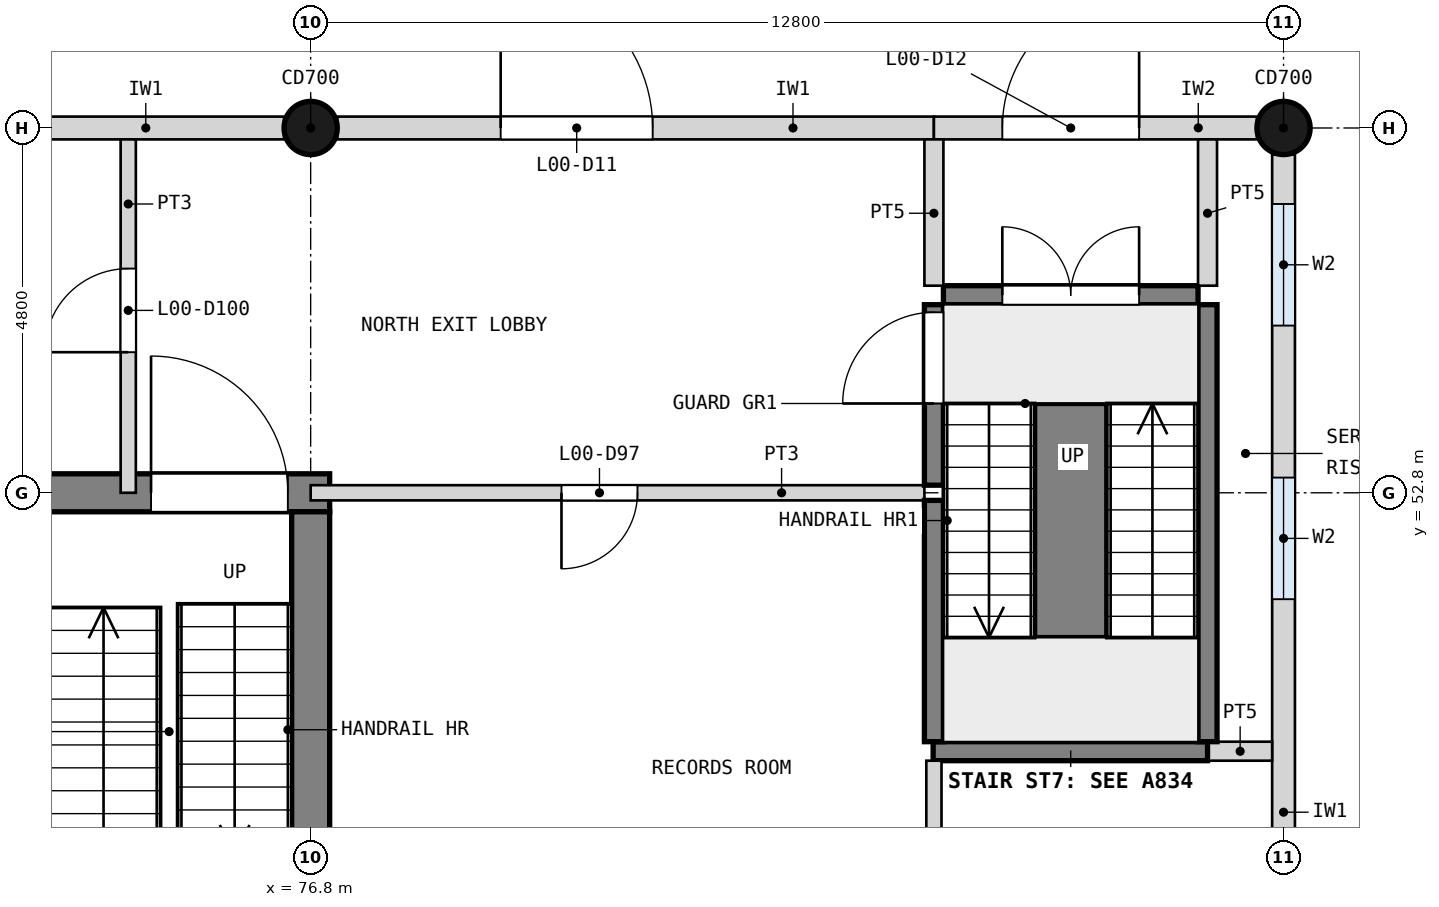
"""IFC4 building model, lengths in metres.
Left out: names, types, materials, properties, quantities, classifications, styles, units other than length and angle.
Written with IfcOpenShell. Run it as: python <this file> out.ifc"""

import sys

from ifc_helpers import new_model, si_unit, direction, frame, frame_2d, origin, origin_2d, place, context, subcontext, project, spatial, rectangle, circle, extrude, element, fill, save


model = new_model("IFC4")
c1 = context("Model", 3, precision=1e-05, world=origin(), true_north=direction((0.0, 1.0)))
c2 = subcontext(c1, "Body", "Model", "MODEL_VIEW")
j1 = project(units=[si_unit("LENGTHUNIT", "METRE"), si_unit("PLANEANGLEUNIT", "RADIAN")], contexts=[c1])
p1 = place(None, origin())
s1 = spatial("IfcSite", under=j1, at=p1, CompositionType="ELEMENT")
p2 = place(p1, origin())
s2 = spatial("IfcBuilding", under=s1, at=p2, CompositionType="ELEMENT")
p3 = place(p2, origin())
s3 = spatial("IfcBuildingStorey", under=s2, at=p3, CompositionType="ELEMENT", Elevation=0.0)
p4 = place(p3, frame((63.75, 52.8, 0.0), z_axis=(0.0, 0.0, 1.0), x_axis=(1.0, 0.0, 0.0)))
e1 = element("IfcWall", 1, at=p4, inside=s3, PredefinedType="SHEAR", context=c2, shape_type="SweptSolid", body=[
    extrude(rectangle(XDim=13.3, YDim=0.5, at=frame_2d((6.65, 0.0))), origin(), (0.0, 0.0, 1.0), 4.2),
])
p5 = place(p4, frame((10.95, 0.0, 0.0)))
e2 = element("IfcOpeningElement", 2, at=p5, cuts=e1, PredefinedType="OPENING", context=c2, shape_type="SweptSolid", body=[
    extrude(rectangle(XDim=1.8, YDim=2.1, at=frame_2d((0.9, 1.05))), frame((0.0, 0.26, 0.0), z_axis=(0.0, -1.0, 0.0), x_axis=(1.0, 0.0, 0.0)), (0.0, 0.0, 1.0), 0.52),
])
p6 = place(p3, frame((76.8, 33.85, 0.0), z_axis=(0.0, 0.0, 1.0), x_axis=(0.0, 1.0, 0.0)))
e3 = element("IfcWall", 3, at=p6, inside=s3, PredefinedType="SHEAR", context=c2, shape_type="SweptSolid", body=[
    extrude(rectangle(XDim=18.7, YDim=0.5, at=frame_2d((9.35, 0.0))), origin(), (0.0, 0.0, 1.0), 4.2),
])
for number, where, z_axis, x_axis in (
    (4, (89.6, 57.6, 0.0), (0.0, 0.0, 1.0), (1.0, 0.0, 0.0)),
    (5, (76.8, 57.6, 0.0), (0.0, 0.0, 1.0), (1.0, 0.0, 0.0)),
):
    element("IfcColumn", number, at=place(p3, frame(where, z_axis=z_axis, x_axis=x_axis)), inside=s3, PredefinedType="COLUMN", context=c2, shape_type="SweptSolid", body=[
        extrude(circle(Radius=0.35, at=origin_2d()), origin(), (0.0, 0.0, 1.0), 4.2),
    ])
p7 = place(p3, frame((64.0, 57.6, 0.0), z_axis=(0.0, 0.0, 1.0), x_axis=(1.0, 0.0, 0.0)))
e6 = element("IfcWall", 6, at=p7, inside=s3, PredefinedType="SOLIDWALL", context=c2, shape_type="SweptSolid", body=[
    extrude(rectangle(XDim=12.45, YDim=0.3, at=frame_2d((6.225, 0.0))), origin(), (0.0, 0.0, 1.0), 3.0),
])
p8 = place(p7, frame((0.8, 0.0, 0.3)))
e7 = element("IfcOpeningElement", 7, at=p8, cuts=e6, PredefinedType="OPENING", context=c2, shape_type="SweptSolid", body=[
    extrude(rectangle(XDim=1.6, YDim=2.4, at=frame_2d((0.8, 1.2))), frame((0.0, 0.16, 0.0), z_axis=(0.0, -1.0, 0.0), x_axis=(1.0, 0.0, 0.0)), (0.0, 0.0, 1.0), 0.32),
])
p9 = place(p7, frame((4.0, 0.0, 0.3)))
e8 = element("IfcOpeningElement", 8, at=p9, cuts=e6, PredefinedType="OPENING", context=c2, shape_type="SweptSolid", body=[
    extrude(rectangle(XDim=1.6, YDim=2.4, at=frame_2d((0.8, 1.2))), frame((0.0, 0.16, 0.0), z_axis=(0.0, -1.0, 0.0), x_axis=(1.0, 0.0, 0.0)), (0.0, 0.0, 1.0), 0.32),
])
p10 = place(p7, frame((7.2, 0.0, 0.3)))
e9 = element("IfcOpeningElement", 9, at=p10, cuts=e6, PredefinedType="OPENING", context=c2, shape_type="SweptSolid", body=[
    extrude(rectangle(XDim=1.6, YDim=2.4, at=frame_2d((0.8, 1.2))), frame((0.0, 0.16, 0.0), z_axis=(0.0, -1.0, 0.0), x_axis=(1.0, 0.0, 0.0)), (0.0, 0.0, 1.0), 0.32),
])
p11 = place(p3, frame((77.15, 57.6, 0.0), z_axis=(0.0, 0.0, 1.0), x_axis=(1.0, 0.0, 0.0)))
e10 = element("IfcWall", 10, at=p11, inside=s3, PredefinedType="SOLIDWALL", context=c2, shape_type="SweptSolid", body=[
    extrude(rectangle(XDim=7.85, YDim=0.3, at=frame_2d((3.925, 0.0))), origin(), (0.0, 0.0, 1.0), 3.0),
])
p12 = place(p11, frame((2.15, 0.0, 0.0)))
e11 = element("IfcOpeningElement", 11, at=p12, cuts=e10, PredefinedType="OPENING", context=c2, shape_type="SweptSolid", body=[
    extrude(rectangle(XDim=2.0, YDim=2.1, at=frame_2d((1.0, 1.05))), frame((0.0, 0.16, 0.0), z_axis=(0.0, -1.0, 0.0), x_axis=(1.0, 0.0, 0.0)), (0.0, 0.0, 1.0), 0.32),
])
p13 = place(p3, frame((85.0, 57.6, 0.0), z_axis=(0.0, 0.0, 1.0), x_axis=(1.0, 0.0, 0.0)))
e12 = element("IfcWall", 12, at=p13, inside=s3, PredefinedType="SOLIDWALL", context=c2, shape_type="SweptSolid", body=[
    extrude(rectangle(XDim=4.25, YDim=0.3, at=frame_2d((2.125, 0.0))), origin(), (0.0, 0.0, 1.0), 3.0),
])
p14 = place(p13, frame((0.9, 0.0, 0.0)))
e13 = element("IfcOpeningElement", 13, at=p14, cuts=e12, PredefinedType="OPENING", context=c2, shape_type="SweptSolid", body=[
    extrude(rectangle(XDim=1.8, YDim=2.1, at=frame_2d((0.9, 1.05))), frame((0.0, 0.16, 0.0), z_axis=(0.0, -1.0, 0.0), x_axis=(1.0, 0.0, 0.0)), (0.0, 0.0, 1.0), 0.32),
])
p15 = place(p3, frame((89.6, 43.55, 0.0), z_axis=(0.0, 0.0, 1.0), x_axis=(0.0, 1.0, 0.0)))
e14 = element("IfcWall", 14, at=p15, inside=s3, PredefinedType="SOLIDWALL", context=c2, shape_type="SweptSolid", body=[
    extrude(rectangle(XDim=13.7, YDim=0.3, at=frame_2d((6.85, 0.0))), origin(), (0.0, 0.0, 1.0), 3.0),
])
p16 = place(p15, frame((0.65, 0.0, 0.3)))
e15 = element("IfcOpeningElement", 15, at=p16, cuts=e14, PredefinedType="OPENING", context=c2, shape_type="SweptSolid", body=[
    extrude(rectangle(XDim=1.6, YDim=2.4, at=frame_2d((0.8, 1.2))), frame((0.0, 0.16, 0.0), z_axis=(0.0, -1.0, 0.0), x_axis=(1.0, 0.0, 0.0)), (0.0, 0.0, 1.0), 0.32),
])
p17 = place(p15, frame((7.85, 0.0, 0.3)))
e16 = element("IfcOpeningElement", 16, at=p17, cuts=e14, PredefinedType="OPENING", context=c2, shape_type="SweptSolid", body=[
    extrude(rectangle(XDim=1.6, YDim=2.4, at=frame_2d((0.8, 1.2))), frame((0.0, 0.16, 0.0), z_axis=(0.0, -1.0, 0.0), x_axis=(1.0, 0.0, 0.0)), (0.0, 0.0, 1.0), 0.32),
])
p18 = place(p15, frame((11.45, 0.0, 0.3)))
e17 = element("IfcOpeningElement", 17, at=p18, cuts=e14, PredefinedType="OPENING", context=c2, shape_type="SweptSolid", body=[
    extrude(rectangle(XDim=1.6, YDim=2.4, at=frame_2d((0.8, 1.2))), frame((0.0, 0.16, 0.0), z_axis=(0.0, -1.0, 0.0), x_axis=(1.0, 0.0, 0.0)), (0.0, 0.0, 1.0), 0.32),
])
p19 = place(p3, frame((89.45, 49.4, 0.0), z_axis=(0.0, 0.0, 1.0), x_axis=(-1.0, 0.0, 0.0)))
e18 = element("IfcWall", 18, at=p19, inside=s3, PredefinedType="PARTITIONING", context=c2, shape_type="SweptSolid", body=[
    extrude(rectangle(XDim=0.85, YDim=0.25, at=frame_2d((0.425, 0.0))), origin(), (0.0, 0.0, 1.0), 3.9),
])
p20 = place(p3, frame((88.6, 49.4, 0.0), z_axis=(0.0, 0.0, 1.0), x_axis=(-1.0, 0.0, 0.0)))
e19 = element("IfcWall", 19, at=p20, inside=s3, PredefinedType="SHEAR", context=c2, shape_type="SweptSolid", body=[
    extrude(rectangle(XDim=3.61, YDim=0.25, at=frame_2d((1.805, 0.0))), origin(), (0.0, 0.0, 1.0), 3.9),
])
p21 = place(p3, frame((84.875, 52.8, 0.0), z_axis=(0.0, 0.0, 1.0), x_axis=(-1.0, 0.0, 0.0)))
e20 = element("IfcWall", 20, at=p21, inside=s3, PredefinedType="PARTITIONING", context=c2, shape_type="SweptSolid", body=[
    extrude(rectangle(XDim=8.075, YDim=0.2, at=frame_2d((4.038, 0.0))), origin(), (0.0, 0.0, 1.0), 3.9),
])
p22 = place(p21, frame((3.775, 0.0, 0.0)))
e21 = element("IfcOpeningElement", 21, at=p22, cuts=e20, PredefinedType="OPENING", context=c2, shape_type="SweptSolid", body=[
    extrude(rectangle(XDim=1.0, YDim=2.1, at=frame_2d((0.5, 1.05))), frame((0.0, 0.11, 0.0), z_axis=(0.0, -1.0, 0.0), x_axis=(1.0, 0.0, 0.0)), (0.0, 0.0, 1.0), 0.22),
])
p23 = place(p3, frame((88.475, 55.4, 0.0), z_axis=(0.0, 0.0, 1.0), x_axis=(-1.0, 0.0, 0.0)))
e22 = element("IfcWall", 22, at=p23, inside=s3, PredefinedType="SHEAR", context=c2, shape_type="SweptSolid", body=[
    extrude(rectangle(XDim=3.35, YDim=0.25, at=frame_2d((1.675, 0.0))), origin(), (0.0, 0.0, 1.0), 3.9),
])
p24 = place(p23, frame((0.775, 0.0, 0.0)))
e23 = element("IfcOpeningElement", 23, at=p24, cuts=e22, PredefinedType="OPENING", context=c2, shape_type="SweptSolid", body=[
    extrude(rectangle(XDim=1.8, YDim=2.1, at=frame_2d((0.9, 1.05))), frame((0.0, 0.135, 0.0), z_axis=(0.0, -1.0, 0.0), x_axis=(1.0, 0.0, 0.0)), (0.0, 0.0, 1.0), 0.27),
])
p25 = place(p3, frame((88.6, 49.525, 0.0), z_axis=(0.0, 0.0, 1.0), x_axis=(0.0, 1.0, 0.0)))
e24 = element("IfcWall", 24, at=p25, inside=s3, PredefinedType="SHEAR", context=c2, shape_type="SweptSolid", body=[
    extrude(rectangle(XDim=5.75, YDim=0.25, at=frame_2d((2.875, 0.0))), origin(), (0.0, 0.0, 1.0), 3.9),
])
p26 = place(p3, frame((88.6, 55.525, 0.0), z_axis=(0.0, 0.0, 1.0), x_axis=(0.0, 1.0, 0.0)))
e25 = element("IfcWall", 25, at=p26, inside=s3, PredefinedType="PARTITIONING", context=c2, shape_type="SweptSolid", body=[
    extrude(rectangle(XDim=1.925, YDim=0.25, at=frame_2d((0.962, 0.0))), origin(), (0.0, 0.0, 1.0), 3.9),
])
p27 = place(p3, frame((85.0, 46.5, 0.0), z_axis=(0.0, 0.0, 1.0), x_axis=(0.0, 1.0, 0.0)))
e26 = element("IfcWall", 26, at=p27, inside=s3, PredefinedType="PARTITIONING", context=c2, shape_type="SweptSolid", body=[
    extrude(rectangle(XDim=2.775, YDim=0.2, at=frame_2d((1.387, 0.0))), origin(), (0.0, 0.0, 1.0), 3.9),
])
p28 = place(p3, frame((85.0, 49.525, 0.0), z_axis=(0.0, 0.0, 1.0), x_axis=(0.0, 1.0, 0.0)))
e27 = element("IfcWall", 27, at=p28, inside=s3, PredefinedType="SHEAR", context=c2, shape_type="SweptSolid", body=[
    extrude(rectangle(XDim=3.175, YDim=0.25, at=frame_2d((1.587, 0.0))), origin(), (0.0, 0.0, 1.0), 3.9),
])
p29 = place(p3, frame((85.0, 52.9, 0.0), z_axis=(0.0, 0.0, 1.0), x_axis=(0.0, 1.0, 0.0)))
e28 = element("IfcWall", 28, at=p29, inside=s3, PredefinedType="SHEAR", context=c2, shape_type="SweptSolid", body=[
    extrude(rectangle(XDim=2.375, YDim=0.25, at=frame_2d((1.188, 0.0))), origin(), (0.0, 0.0, 1.0), 3.9),
])
p30 = place(p29, frame((1.075, 0.0, 0.0)))
e29 = element("IfcOpeningElement", 29, at=p30, cuts=e28, PredefinedType="OPENING", context=c2, shape_type="SweptSolid", body=[
    extrude(rectangle(XDim=1.2, YDim=2.1, at=frame_2d((0.6, 1.05))), frame((0.0, 0.135, 0.0), z_axis=(0.0, -1.0, 0.0), x_axis=(1.0, 0.0, 0.0)), (0.0, 0.0, 1.0), 0.27),
])
p31 = place(p3, frame((85.0, 55.525, 0.0), z_axis=(0.0, 0.0, 1.0), x_axis=(0.0, 1.0, 0.0)))
e30 = element("IfcWall", 30, at=p31, inside=s3, PredefinedType="PARTITIONING", context=c2, shape_type="SweptSolid", body=[
    extrude(rectangle(XDim=1.925, YDim=0.25, at=frame_2d((0.962, 0.0))), origin(), (0.0, 0.0, 1.0), 3.9),
])
p32 = place(p3, frame((74.4, 52.8, 0.0), z_axis=(0.0, 0.0, 1.0), x_axis=(0.0, 1.0, 0.0)))
e31 = element("IfcWall", 31, at=p32, inside=s3, PredefinedType="PARTITIONING", context=c2, shape_type="SweptSolid", body=[
    extrude(rectangle(XDim=4.65, YDim=0.2, at=frame_2d((2.325, 0.0))), origin(), (0.0, 0.0, 1.0), 3.9),
])
p33 = place(p32, frame((1.85, 0.0, 0.0)))
e32 = element("IfcOpeningElement", 32, at=p33, cuts=e31, PredefinedType="OPENING", context=c2, shape_type="SweptSolid", body=[
    extrude(rectangle(XDim=1.1, YDim=2.1, at=frame_2d((0.55, 1.05))), frame((0.0, 0.11, 0.0), z_axis=(0.0, -1.0, 0.0), x_axis=(1.0, 0.0, 0.0)), (0.0, 0.0, 1.0), 0.22),
])
p34 = place(p3, frame((86.8, 53.975, 0.0), z_axis=(0.0, 0.0, 1.0), x_axis=(0.0, -1.0, 0.0)))
e33 = element("IfcWall", 33, at=p34, inside=s3, PredefinedType="SHEAR", context=c2, shape_type="SweptSolid", body=[
    extrude(rectangle(XDim=3.08, YDim=0.95, at=frame_2d((1.54, 0.0))), origin(), (0.0, 0.0, 1.0), 4.2),
])
p35 = place(p12, origin())
e34 = element("IfcDoor", 34, at=p35, inside=s3, OperationType="SINGLE_SWING_LEFT", PredefinedType="DOOR", context=c2, shape_type="SweptSolid", body=[
    extrude(rectangle(XDim=2.0, YDim=2.1, at=frame_2d((1.0, 1.05))), frame((0.0, 0.025, 0.0), z_axis=(0.0, -1.0, 0.0), x_axis=(1.0, 0.0, 0.0)), (0.0, 0.0, 1.0), 0.05),
])
fill(e11, e34)
p36 = place(p14, origin())
e35 = element("IfcDoor", 35, at=p36, inside=s3, OperationType="SINGLE_SWING_RIGHT", PredefinedType="DOOR", context=c2, shape_type="SweptSolid", body=[
    extrude(rectangle(XDim=1.8, YDim=2.1, at=frame_2d((0.9, 1.05))), frame((0.0, 0.025, 0.0), z_axis=(0.0, -1.0, 0.0), x_axis=(1.0, 0.0, 0.0)), (0.0, 0.0, 1.0), 0.05),
])
fill(e13, e35)
p37 = place(p5, origin())
e36 = element("IfcDoor", 36, at=p37, inside=s3, OperationType="SINGLE_SWING_LEFT", PredefinedType="DOOR", context=c2, shape_type="SweptSolid", body=[
    extrude(rectangle(XDim=1.8, YDim=2.1, at=frame_2d((0.9, 1.05))), frame((0.0, 0.025, 0.0), z_axis=(0.0, -1.0, 0.0), x_axis=(1.0, 0.0, 0.0)), (0.0, 0.0, 1.0), 0.05),
])
fill(e2, e36)
p38 = place(p22, origin())
e37 = element("IfcDoor", 37, at=p38, inside=s3, OperationType="SINGLE_SWING_RIGHT", PredefinedType="DOOR", context=c2, shape_type="SweptSolid", body=[
    extrude(rectangle(XDim=1.0, YDim=2.1, at=frame_2d((0.5, 1.05))), frame((0.0, 0.025, 0.0), z_axis=(0.0, -1.0, 0.0), x_axis=(1.0, 0.0, 0.0)), (0.0, 0.0, 1.0), 0.05),
])
fill(e21, e37)
p39 = place(p30, origin())
e38 = element("IfcDoor", 38, at=p39, inside=s3, OperationType="SINGLE_SWING_LEFT", PredefinedType="DOOR", context=c2, shape_type="SweptSolid", body=[
    extrude(rectangle(XDim=1.2, YDim=2.1, at=frame_2d((0.6, 1.05))), frame((0.0, 0.025, 0.0), z_axis=(0.0, -1.0, 0.0), x_axis=(1.0, 0.0, 0.0)), (0.0, 0.0, 1.0), 0.05),
])
fill(e29, e38)
p40 = place(p24, frame((1.8, 0.0, 0.0), z_axis=(0.0, 0.0, 1.0), x_axis=(-1.0, 0.0, 0.0)))
e39 = element("IfcDoor", 39, at=p40, inside=s3, OperationType="DOUBLE_DOOR_SINGLE_SWING", PredefinedType="DOOR", context=c2, shape_type="SweptSolid", body=[
    extrude(rectangle(XDim=1.8, YDim=2.1, at=frame_2d((0.9, 1.05))), frame((0.0, 0.025, 0.0), z_axis=(0.0, -1.0, 0.0), x_axis=(1.0, 0.0, 0.0)), (0.0, 0.0, 1.0), 0.05),
])
fill(e23, e39)
p41 = place(p33, origin())
e40 = element("IfcDoor", 40, at=p41, inside=s3, OperationType="SINGLE_SWING_LEFT", PredefinedType="DOOR", context=c2, shape_type="SweptSolid", body=[
    extrude(rectangle(XDim=1.1, YDim=2.1, at=frame_2d((0.55, 1.05))), frame((0.0, 0.025, 0.0), z_axis=(0.0, -1.0, 0.0), x_axis=(1.0, 0.0, 0.0)), (0.0, 0.0, 1.0), 0.05),
])
fill(e32, e40)
p42 = place(p17, origin())
e41 = element("IfcWindow", 41, at=p42, inside=s3, PartitioningType="SINGLE_PANEL", PredefinedType="WINDOW", context=c2, shape_type="SweptSolid", body=[
    extrude(rectangle(XDim=1.6, YDim=2.4, at=frame_2d((0.8, 1.2))), frame((0.0, 0.03, 0.0), z_axis=(0.0, -1.0, 0.0), x_axis=(1.0, 0.0, 0.0)), (0.0, 0.0, 1.0), 0.06),
])
fill(e16, e41)
p43 = place(p18, origin())
e42 = element("IfcWindow", 42, at=p43, inside=s3, PartitioningType="SINGLE_PANEL", PredefinedType="WINDOW", context=c2, shape_type="SweptSolid", body=[
    extrude(rectangle(XDim=1.6, YDim=2.4, at=frame_2d((0.8, 1.2))), frame((0.0, 0.03, 0.0), z_axis=(0.0, -1.0, 0.0), x_axis=(1.0, 0.0, 0.0)), (0.0, 0.0, 1.0), 0.06),
])
fill(e17, e42)
save(model, sys.argv[1])
